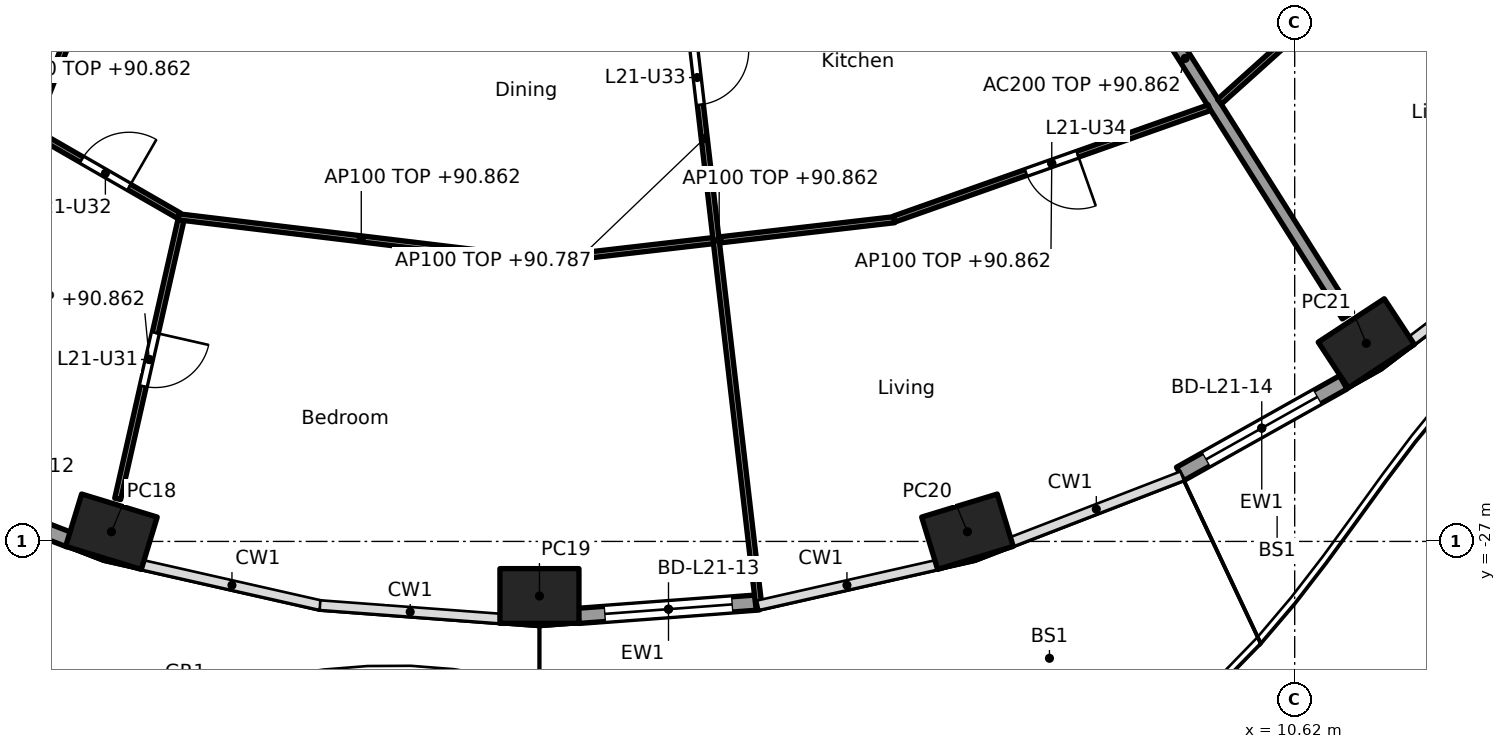
"""IFC4 building model, lengths in metres.
Left out: names, types, materials, properties, quantities, classifications, styles, units other than length and angle.
Written with IfcOpenShell. Run it as: python <this file> out.ifc"""

import sys

from ifc_helpers import new_model, si_unit, direction, frame, frame_2d, origin, origin_2d, place, context, subcontext, project, spatial, rectangle, hollow_rectangle, extrude, element, fill, save


model = new_model("IFC4")
c1 = context("Model", 3, precision=1e-05, world=origin(), true_north=direction((0.0, 1.0)))
c2 = subcontext(c1, "Body", "Model", "MODEL_VIEW")
j1 = project(units=[si_unit("LENGTHUNIT", "METRE"), si_unit("PLANEANGLEUNIT", "RADIAN")], contexts=[c1])
p1 = place(None, origin())
s1 = spatial("IfcSite", under=j1, at=p1, CompositionType="ELEMENT")
p2 = place(p1, origin())
s2 = spatial("IfcBuilding", under=s1, at=p2, CompositionType="ELEMENT")
p3 = place(p2, frame((0.0, 0.0, 88.1)))
s3 = spatial("IfcBuildingStorey", under=s2, at=p3, CompositionType="ELEMENT", Elevation=88.1)
for number, where, z_axis, x_axis in (
    (1, (-8.839, -26.841, 0.0), (0.0, 0.0, 1.0), (0.957, -0.292, 0.0)),
    (2, (-1.8, -27.897, 0.0), (0.0, 0.0, 1.0), (1.0, 0.0, 0.0)),
    (3, (5.239, -26.841, 0.0), (0.0, 0.0, 1.0), (0.957, 0.292, 0.0)),
    (4, (11.798, -23.742, 0.0), (0.0, 0.0, 1.0), (0.836, 0.549, 0.0)),
):
    element("IfcColumn", number, at=place(p3, frame(where, z_axis=z_axis, x_axis=x_axis)), inside=s3, PredefinedType="COLUMN", context=c2, shape_type="SweptSolid", body=[
        extrude(hollow_rectangle(XDim=1.3, YDim=0.9, WallThickness=0.045, at=origin_2d()), origin(), (0.0, 0.0, 1.0), 3.7),
    ])
p4 = place(p3, frame((-9.529, -26.973, 0.0), z_axis=(0.0, 0.0, 1.0), x_axis=(-0.932827091302, 0.360324322982, 0.0)))
e5 = element("IfcWall", 5, at=p4, inside=s3, PredefinedType="SOLIDWALL", context=c2, shape_type="SweptSolid", body=[
    extrude(rectangle(XDim=3.027, YDim=0.25, at=frame_2d((1.514, 0.0))), origin(), (0.0, 0.0, 1.0), 3.44),
])
p5 = place(p4, frame((0.464, 0.0, 0.0)))
e6 = element("IfcOpeningElement", 6, at=p5, cuts=e5, PredefinedType="OPENING", context=c2, shape_type="SweptSolid", body=[
    extrude(rectangle(XDim=2.1, YDim=2.4, at=frame_2d((1.05, 1.2))), frame((0.0, 0.135, 0.0), z_axis=(0.0, -1.0, 0.0), x_axis=(1.0, 0.0, 0.0)), (0.0, 0.0, 1.0), 0.27),
])
p6 = place(p3, frame((1.806, -28.003, 0.0), z_axis=(0.0, 0.0, 1.0), x_axis=(-0.997226174467, -0.074430887117, 0.0)))
e7 = element("IfcWall", 7, at=p6, inside=s3, PredefinedType="SOLIDWALL", context=c2, shape_type="SweptSolid", body=[
    extrude(rectangle(XDim=2.975, YDim=0.25, at=frame_2d((1.488, 0.0))), origin(), (0.0, 0.0, 1.0), 3.44),
])
p7 = place(p6, frame((0.438, 0.0, 0.0)))
e8 = element("IfcOpeningElement", 8, at=p7, cuts=e7, PredefinedType="OPENING", context=c2, shape_type="SweptSolid", body=[
    extrude(rectangle(XDim=2.1, YDim=2.4, at=frame_2d((1.05, 1.2))), frame((0.0, 0.135, 0.0), z_axis=(0.0, -1.0, 0.0), x_axis=(1.0, 0.0, 0.0)), (0.0, 0.0, 1.0), 0.27),
])
p8 = place(p3, frame((11.419, -24.384, 0.0), z_axis=(0.0, 0.0, 1.0), x_axis=(-0.872071158476, -0.489379090843, 0.0)))
e9 = element("IfcWall", 9, at=p8, inside=s3, PredefinedType="SOLIDWALL", context=c2, shape_type="SweptSolid", body=[
    extrude(rectangle(XDim=3.076, YDim=0.25, at=frame_2d((1.538, 0.0))), origin(), (0.0, 0.0, 1.0), 3.44),
])
p9 = place(p8, frame((0.488, 0.0, 0.0)))
e10 = element("IfcOpeningElement", 10, at=p9, cuts=e9, PredefinedType="OPENING", context=c2, shape_type="SweptSolid", body=[
    extrude(rectangle(XDim=2.1, YDim=2.4, at=frame_2d((1.05, 1.2))), frame((0.0, 0.135, 0.0), z_axis=(0.0, -1.0, 0.0), x_axis=(1.0, 0.0, 0.0)), (0.0, 0.0, 1.0), 0.27),
])
p10 = place(p3, frame((6.15, -14.824, 0.0), z_axis=(0.0, 0.0, 1.0), x_axis=(0.533492589682, -0.845804739142, 0.0)))
e11 = element("IfcWall", 11, at=p10, inside=s3, PredefinedType="PARTITIONING", context=c2, shape_type="SweptSolid", body=[
    extrude(rectangle(XDim=10.006, YDim=0.2, at=frame_2d((5.003, 0.0))), origin(), (0.0, 0.0, 1.0), 2.762),
])
p11 = place(p3, frame((-12.568, -18.856, 0.0), z_axis=(0.0, 0.0, 1.0), x_axis=(0.866532513598, -0.499120629585, 0.0)))
e12 = element("IfcWall", 12, at=p11, inside=s3, PredefinedType="PARTITIONING", context=c2, shape_type="SweptSolid", body=[
    extrude(rectangle(XDim=5.585, YDim=0.1, at=frame_2d((2.792, 0.0))), origin(), (0.0, 0.0, 1.0), 2.762),
])
p12 = place(p11, frame((3.739, 0.0, 0.0)))
e13 = element("IfcOpeningElement", 13, at=p12, cuts=e12, PredefinedType="OPENING", context=c2, shape_type="SweptSolid", body=[
    extrude(rectangle(XDim=0.9, YDim=2.1, at=frame_2d((0.45, 1.05))), frame((0.0, 0.06, 0.0), z_axis=(0.0, -1.0, 0.0), x_axis=(1.0, 0.0, 0.0)), (0.0, 0.0, 1.0), 0.12),
])
p13 = place(p3, frame((-8.177, -15.231, 0.0), z_axis=(0.0, 0.0, 1.0), x_axis=(-0.365520869553, -0.930803144559, 0.0)))
e14 = element("IfcWall", 14, at=p13, inside=s3, PredefinedType="PARTITIONING", context=c2, shape_type="SweptSolid", body=[
    extrude(rectangle(XDim=5.342, YDim=0.1, at=frame_2d((2.671, 0.0))), origin(), (0.0, 0.0, 1.0), 3.44),
])
p14 = place(p3, frame((-7.696, -21.717, 0.0), z_axis=(0.0, 0.0, 1.0), x_axis=(-0.221196717441, -0.97522921008, 0.0)))
e15 = element("IfcWall", 15, at=p14, inside=s3, PredefinedType="PARTITIONING", context=c2, shape_type="SweptSolid", body=[
    extrude(rectangle(XDim=4.7, YDim=0.1, at=frame_2d((2.35, 0.0))), origin(), (0.0, 0.0, 1.0), 2.762),
])
p15 = place(p14, frame((1.9, 0.0, 0.0)))
e16 = element("IfcOpeningElement", 16, at=p15, cuts=e15, PredefinedType="OPENING", context=c2, shape_type="SweptSolid", body=[
    extrude(rectangle(XDim=0.9, YDim=2.1, at=frame_2d((0.45, 1.05))), frame((0.0, 0.06, 0.0), z_axis=(0.0, -1.0, 0.0), x_axis=(1.0, 0.0, 0.0)), (0.0, 0.0, 1.0), 0.12),
])
p16 = place(p3, frame((-7.735, -21.662, 0.0), z_axis=(0.0, 0.0, 1.0), x_axis=(0.992808347289, -0.119714600421, 0.0)))
e17 = element("IfcWall", 17, at=p16, inside=s3, PredefinedType="PARTITIONING", context=c2, shape_type="SweptSolid", body=[
    extrude(rectangle(XDim=6.053, YDim=0.1, at=frame_2d((3.026, 0.0))), origin(), (0.0, 0.0, 1.0), 2.762),
])
p17 = place(p3, frame((-1.726, -22.375, 0.0), z_axis=(0.0, 0.0, 1.0), x_axis=(0.993392336919, 0.114767874207, 0.0)))
e18 = element("IfcWall", 18, at=p17, inside=s3, PredefinedType="PARTITIONING", context=c2, shape_type="SweptSolid", body=[
    extrude(rectangle(XDim=5.801, YDim=0.1, at=frame_2d((2.9, 0.0))), origin(), (0.0, 0.0, 1.0), 2.762),
])
p18 = place(p3, frame((0.011, -12.664, 0.0), z_axis=(0.0, 0.0, 1.0), x_axis=(0.115841404661, -0.993267722704, 0.0)))
e19 = element("IfcWall", 19, at=p18, inside=s3, PredefinedType="PARTITIONING", context=c2, shape_type="SweptSolid", body=[
    extrude(rectangle(XDim=15.528, YDim=0.1, at=frame_2d((7.764, 0.0))), origin(), (0.0, 0.0, 1.0), 2.687),
])
p19 = place(p18, frame((6.303, 0.0, 0.0)))
e20 = element("IfcOpeningElement", 20, at=p19, cuts=e19, PredefinedType="OPENING", context=c2, shape_type="SweptSolid", body=[
    extrude(rectangle(XDim=0.9, YDim=2.1, at=frame_2d((0.45, 1.05))), frame((0.0, 0.06, 0.0), z_axis=(0.0, -1.0, 0.0), x_axis=(1.0, 0.0, 0.0)), (0.0, 0.0, 1.0), 0.12),
])
p20 = place(p3, frame((4.034, -21.698, 0.0), z_axis=(0.0, 0.0, 1.0), x_axis=(0.942861482644, 0.33318497047, 0.0)))
e21 = element("IfcWall", 21, at=p20, inside=s3, PredefinedType="PARTITIONING", context=c2, shape_type="SweptSolid", body=[
    extrude(rectangle(XDim=5.495, YDim=0.1, at=frame_2d((2.748, 0.0))), origin(), (0.0, 0.0, 1.0), 2.762),
])
p21 = place(p20, frame((2.297, 0.0, 0.0)))
e22 = element("IfcOpeningElement", 22, at=p21, cuts=e21, PredefinedType="OPENING", context=c2, shape_type="SweptSolid", body=[
    extrude(rectangle(XDim=0.9, YDim=2.1, at=frame_2d((0.45, 1.05))), frame((0.0, 0.06, 0.0), z_axis=(0.0, -1.0, 0.0), x_axis=(1.0, 0.0, 0.0)), (0.0, 0.0, 1.0), 0.12),
])
p22 = place(p3, frame((9.384, -19.768, 0.0), z_axis=(0.0, 0.0, 1.0), x_axis=(0.74387407395, 0.668319805262, 0.0)))
e23 = element("IfcWall", 23, at=p22, inside=s3, PredefinedType="PARTITIONING", context=c2, shape_type="SweptSolid", body=[
    extrude(rectangle(XDim=6.695, YDim=0.1, at=frame_2d((3.348, 0.0))), origin(), (0.0, 0.0, 1.0), 2.762),
])
p23 = place(p22, frame((2.898, 0.0, 0.0)))
e24 = element("IfcOpeningElement", 24, at=p23, cuts=e23, PredefinedType="OPENING", context=c2, shape_type="SweptSolid", body=[
    extrude(rectangle(XDim=0.9, YDim=2.1, at=frame_2d((0.45, 1.05))), frame((0.0, 0.06, 0.0), z_axis=(0.0, -1.0, 0.0), x_axis=(1.0, 0.0, 0.0)), (0.0, 0.0, 1.0), 0.12),
])
p24 = place(p7, origin())
e25 = element("IfcDoor", 25, at=p24, inside=s3, OperationType="SLIDING_TO_LEFT", PredefinedType="DOOR", context=c2, shape_type="SweptSolid", body=[
    extrude(rectangle(XDim=2.1, YDim=2.4, at=frame_2d((1.05, 1.2))), frame((0.0, 0.025, 0.0), z_axis=(0.0, -1.0, 0.0), x_axis=(1.0, 0.0, 0.0)), (0.0, 0.0, 1.0), 0.05),
])
fill(e8, e25)
p25 = place(p9, origin())
e26 = element("IfcDoor", 26, at=p25, inside=s3, OperationType="SLIDING_TO_LEFT", PredefinedType="DOOR", context=c2, shape_type="SweptSolid", body=[
    extrude(rectangle(XDim=2.1, YDim=2.4, at=frame_2d((1.05, 1.2))), frame((0.0, 0.025, 0.0), z_axis=(0.0, -1.0, 0.0), x_axis=(1.0, 0.0, 0.0)), (0.0, 0.0, 1.0), 0.05),
])
fill(e10, e26)
p26 = place(p15, origin())
e27 = element("IfcDoor", 27, at=p26, inside=s3, OperationType="SINGLE_SWING_LEFT", PredefinedType="DOOR", context=c2, shape_type="SweptSolid", body=[
    extrude(rectangle(XDim=0.9, YDim=2.1, at=frame_2d((0.45, 1.05))), frame((0.0, 0.025, 0.0), z_axis=(0.0, -1.0, 0.0), x_axis=(1.0, 0.0, 0.0)), (0.0, 0.0, 1.0), 0.05),
])
fill(e16, e27)
p27 = place(p12, origin())
e28 = element("IfcDoor", 28, at=p27, inside=s3, OperationType="SINGLE_SWING_RIGHT", PredefinedType="DOOR", context=c2, shape_type="SweptSolid", body=[
    extrude(rectangle(XDim=0.9, YDim=2.1, at=frame_2d((0.45, 1.05))), frame((0.0, 0.025, 0.0), z_axis=(0.0, -1.0, 0.0), x_axis=(1.0, 0.0, 0.0)), (0.0, 0.0, 1.0), 0.05),
])
fill(e13, e28)
p28 = place(p19, origin())
e29 = element("IfcDoor", 29, at=p28, inside=s3, OperationType="SINGLE_SWING_LEFT", PredefinedType="DOOR", context=c2, shape_type="SweptSolid", body=[
    extrude(rectangle(XDim=0.9, YDim=2.1, at=frame_2d((0.45, 1.05))), frame((0.0, 0.025, 0.0), z_axis=(0.0, -1.0, 0.0), x_axis=(1.0, 0.0, 0.0)), (0.0, 0.0, 1.0), 0.05),
])
fill(e20, e29)
p29 = place(p21, frame((0.9, 0.0, 0.0), x_axis=(-1.0, 0.0, 0.0)))
e30 = element("IfcDoor", 30, at=p29, inside=s3, OperationType="SINGLE_SWING_LEFT", PredefinedType="DOOR", context=c2, shape_type="SweptSolid", body=[
    extrude(rectangle(XDim=0.9, YDim=2.1, at=frame_2d((0.45, 1.05))), frame((0.0, 0.025, 0.0), z_axis=(0.0, -1.0, 0.0), x_axis=(1.0, 0.0, 0.0)), (0.0, 0.0, 1.0), 0.05),
])
fill(e22, e30)
save(model, sys.argv[1])
